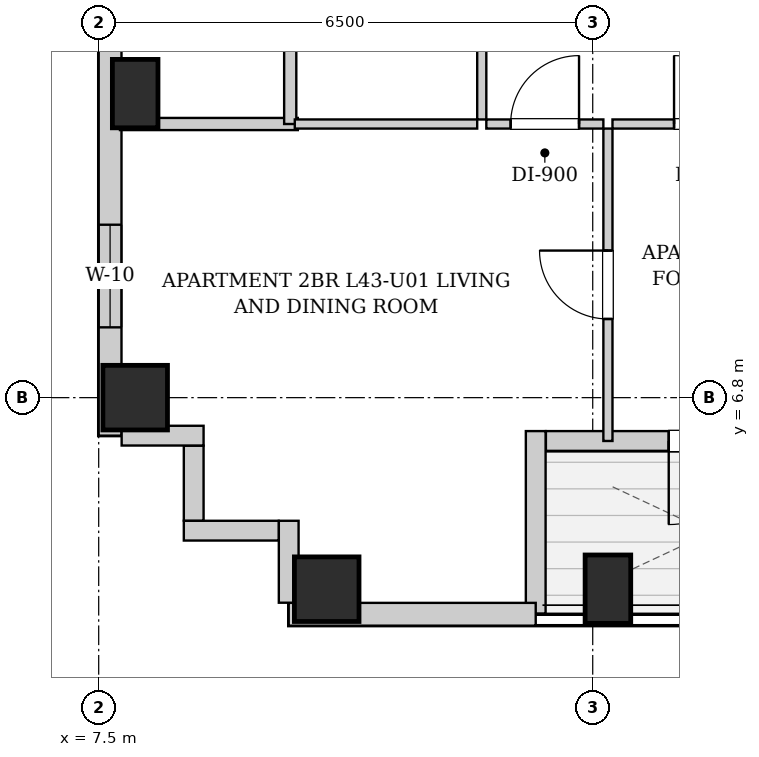
"""IFC4 building model, lengths in metres.
Left out: names, types, materials, properties, quantities, classifications, styles, units other than length and angle.
Written with IfcOpenShell. Run it as: python <this file> out.ifc"""

import sys

from ifc_helpers import new_model, si_unit, direction, frame, frame_2d, origin, origin_2d, place, context, subcontext, project, spatial, rectangle, extrude, element, fill, save


model = new_model("IFC4")
c1 = context("Model", 3, precision=1e-05, world=origin(), true_north=direction((0.0, 1.0)))
c2 = subcontext(c1, "Body", "Model", "MODEL_VIEW")
j1 = project(units=[si_unit("LENGTHUNIT", "METRE"), si_unit("PLANEANGLEUNIT", "RADIAN")], contexts=[c1])
p1 = place(None, origin())
s1 = spatial("IfcSite", under=j1, at=p1, CompositionType="ELEMENT")
p2 = place(p1, origin())
s2 = spatial("IfcBuilding", under=s1, at=p2, CompositionType="ELEMENT")
p3 = place(p2, frame((0.0, 0.0, 150.4)))
s3 = spatial("IfcBuildingStorey", under=s2, at=p3, CompositionType="ELEMENT", Elevation=150.4)
p4 = place(p3, frame((10.5, 4.28, 0.0), z_axis=(0.0, 0.0, 1.0), x_axis=(1.0, 0.0, 0.0)))
e1 = element("IfcColumn", 1, at=p4, inside=s3, PredefinedType="COLUMN", context=c2, shape_type="SweptSolid", body=[
    extrude(rectangle(XDim=0.85, YDim=0.85, at=origin_2d()), origin(), (0.0, 0.0, 1.0), 3.25),
])
p5 = place(p3, frame((14.2, 4.28, 0.0), z_axis=(0.0, 0.0, 1.0), x_axis=(1.0, 0.0, 0.0)))
e2 = element("IfcColumn", 2, at=p5, inside=s3, PredefinedType="COLUMN", context=c2, shape_type="SweptSolid", body=[
    extrude(rectangle(XDim=0.6, YDim=0.9, at=origin_2d()), origin(), (0.0, 0.0, 1.0), 3.25),
])
p6 = place(p3, frame((7.98, 6.8, 0.0), z_axis=(0.0, 0.0, 1.0), x_axis=(1.0, 0.0, 0.0)))
e3 = element("IfcColumn", 3, at=p6, inside=s3, PredefinedType="COLUMN", context=c2, shape_type="SweptSolid", body=[
    extrude(rectangle(XDim=0.85, YDim=0.85, at=origin_2d()), origin(), (0.0, 0.0, 1.0), 3.25),
])
p7 = place(p3, frame((7.98, 10.8, 0.0), z_axis=(0.0, 0.0, 1.0), x_axis=(1.0, 0.0, 0.0)))
e4 = element("IfcColumn", 4, at=p7, inside=s3, PredefinedType="COLUMN", context=c2, shape_type="SweptSolid", body=[
    extrude(rectangle(XDim=0.6, YDim=0.9, at=origin_2d()), origin(), (0.0, 0.0, 1.0), 3.25),
])
p8 = place(p3, frame((17.716, 6.23, 0.0), z_axis=(0.0, 0.0, 1.0), x_axis=(-1.0, 0.0, 0.0)))
e5 = element("IfcWall", 5, at=p8, inside=s3, PredefinedType="SOLIDWALL", context=c2, shape_type="SweptSolid", body=[
    extrude(rectangle(XDim=4.332, YDim=0.26, at=frame_2d((2.166, 0.0))), origin(), (0.0, 0.0, 1.0), 2.99),
])
p9 = place(p8, frame((1.616, 0.0, 0.0)))
e6 = element("IfcOpeningElement", 6, at=p9, cuts=e5, PredefinedType="OPENING", context=c2, shape_type="SweptSolid", body=[
    extrude(rectangle(XDim=1.1, YDim=2.0, at=frame_2d((0.55, 1.0))), frame((0.0, 0.14, 0.0), z_axis=(0.0, -1.0, 0.0), x_axis=(1.0, 0.0, 0.0)), (0.0, 0.0, 1.0), 0.28),
])
p10 = place(p8, frame((0.606, 0.0, 0.55)))
e7 = element("IfcOpeningElement", 7, at=p10, cuts=e5, PredefinedType="OPENING", context=c2, shape_type="SweptSolid", body=[
    extrude(rectangle(XDim=0.85, YDim=1.2, at=frame_2d((0.425, 0.6))), frame((0.0, 0.14, 0.0), z_axis=(0.0, -1.0, 0.0), x_axis=(1.0, 0.0, 0.0)), (0.0, 0.0, 1.0), 0.28),
])
p11 = place(p3, frame((13.25, 6.36, 0.0), z_axis=(0.0, 0.0, 1.0), x_axis=(0.0, -1.0, 0.0)))
e8 = element("IfcWall", 8, at=p11, inside=s3, PredefinedType="SOLIDWALL", context=c2, shape_type="SweptSolid", body=[
    extrude(rectangle(XDim=2.4, YDim=0.26, at=frame_2d((1.2, 0.0))), origin(), (0.0, 0.0, 1.0), 2.99),
])
p12 = place(p3, frame((13.25, 3.95, 0.0), z_axis=(0.0, 0.0, 1.0), x_axis=(-1.0, 0.0, 0.0)))
e9 = element("IfcWall", 9, at=p12, inside=s3, PredefinedType="SOLIDWALL", context=c2, shape_type="SweptSolid", body=[
    extrude(rectangle(XDim=3.25, YDim=0.3, at=frame_2d((1.625, 0.0))), origin(), (0.0, 0.0, 1.0), 2.99),
])
p13 = place(p3, frame((7.65, 6.3, 0.0), z_axis=(0.0, 0.0, 1.0), x_axis=(0.0, 1.0, 0.0)))
e10 = element("IfcWall", 10, at=p13, inside=s3, PredefinedType="SOLIDWALL", context=c2, shape_type="SweptSolid", body=[
    extrude(rectangle(XDim=34.5, YDim=0.3, at=frame_2d((17.25, 0.0))), origin(), (0.0, 0.0, 1.0), 2.99),
])
p14 = place(p13, frame((1.425, 0.0, 0.55)))
e11 = element("IfcOpeningElement", 11, at=p14, cuts=e10, PredefinedType="OPENING", context=c2, shape_type="SweptSolid", body=[
    extrude(rectangle(XDim=1.35, YDim=1.2, at=frame_2d((0.675, 0.6))), frame((0.0, 0.16, 0.0), z_axis=(0.0, -1.0, 0.0), x_axis=(1.0, 0.0, 0.0)), (0.0, 0.0, 1.0), 0.32),
])
p15 = place(p13, frame((30.15, 0.0, 0.55)))
e12 = element("IfcOpeningElement", 12, at=p15, cuts=e10, PredefinedType="OPENING", context=c2, shape_type="SweptSolid", body=[
    extrude(rectangle(XDim=1.35, YDim=1.2, at=frame_2d((0.675, 0.6))), frame((0.0, 0.16, 0.0), z_axis=(0.0, -1.0, 0.0), x_axis=(1.0, 0.0, 0.0)), (0.0, 0.0, 1.0), 0.32),
])
p16 = place(p13, frame((28.31, 0.0, 0.55)))
e13 = element("IfcOpeningElement", 13, at=p16, cuts=e10, PredefinedType="OPENING", context=c2, shape_type="SweptSolid", body=[
    extrude(rectangle(XDim=1.35, YDim=1.2, at=frame_2d((0.675, 0.6))), frame((0.0, 0.16, 0.0), z_axis=(0.0, -1.0, 0.0), x_axis=(1.0, 0.0, 0.0)), (0.0, 0.0, 1.0), 0.32),
])
p17 = place(p13, frame((10.35, 0.0, 0.55)))
e14 = element("IfcOpeningElement", 14, at=p17, cuts=e10, PredefinedType="OPENING", context=c2, shape_type="SweptSolid", body=[
    extrude(rectangle(XDim=1.35, YDim=1.2, at=frame_2d((0.675, 0.6))), frame((0.0, 0.16, 0.0), z_axis=(0.0, -1.0, 0.0), x_axis=(1.0, 0.0, 0.0)), (0.0, 0.0, 1.0), 0.32),
])
p18 = place(p13, frame((19.725, 0.0, 0.55)))
e15 = element("IfcOpeningElement", 15, at=p18, cuts=e10, PredefinedType="OPENING", context=c2, shape_type="SweptSolid", body=[
    extrude(rectangle(XDim=1.35, YDim=1.2, at=frame_2d((0.675, 0.6))), frame((0.0, 0.16, 0.0), z_axis=(0.0, -1.0, 0.0), x_axis=(1.0, 0.0, 0.0)), (0.0, 0.0, 1.0), 0.32),
])
p19 = place(p3, frame((10.0, 4.102, 0.0), z_axis=(0.0, 0.0, 1.0), x_axis=(0.0, 1.0, 0.0)))
e16 = element("IfcWall", 16, at=p19, inside=s3, PredefinedType="SOLIDWALL", context=c2, shape_type="SweptSolid", body=[
    extrude(rectangle(XDim=1.078, YDim=0.26, at=frame_2d((0.539, 0.0))), origin(), (0.0, 0.0, 1.0), 2.99),
])
p20 = place(p3, frame((9.868, 5.05, 0.0), z_axis=(0.0, 0.0, 1.0), x_axis=(-1.0, 0.0, 0.0)))
e17 = element("IfcWall", 17, at=p20, inside=s3, PredefinedType="SOLIDWALL", context=c2, shape_type="SweptSolid", body=[
    extrude(rectangle(XDim=1.248, YDim=0.26, at=frame_2d((0.624, 0.0))), origin(), (0.0, 0.0, 1.0), 2.99),
])
p21 = place(p3, frame((8.75, 5.182, 0.0), z_axis=(0.0, 0.0, 1.0), x_axis=(0.0, 1.0, 0.0)))
e18 = element("IfcWall", 18, at=p21, inside=s3, PredefinedType="SOLIDWALL", context=c2, shape_type="SweptSolid", body=[
    extrude(rectangle(XDim=0.986, YDim=0.26, at=frame_2d((0.493, 0.0))), origin(), (0.0, 0.0, 1.0), 2.99),
])
p22 = place(p3, frame((8.88, 6.3, 0.0), z_axis=(0.0, 0.0, 1.0), x_axis=(-1.0, 0.0, 0.0)))
e19 = element("IfcWall", 19, at=p22, inside=s3, PredefinedType="SOLIDWALL", context=c2, shape_type="SweptSolid", body=[
    extrude(rectangle(XDim=1.078, YDim=0.26, at=frame_2d((0.539, 0.0))), origin(), (0.0, 0.0, 1.0), 2.99),
])
p23 = place(p3, frame((7.78, 10.4, 0.0), z_axis=(0.0, 0.0, 1.0), x_axis=(1.0, 0.0, 0.0)))
e20 = element("IfcWall", 20, at=p23, inside=s3, PredefinedType="PARTITIONING", context=c2, shape_type="SweptSolid", body=[
    extrude(rectangle(XDim=2.34, YDim=0.16, at=frame_2d((1.17, 0.0))), origin(), (0.0, 0.0, 1.0), 2.99),
])
p24 = place(p3, frame((10.02, 10.4, 0.0), z_axis=(0.0, 0.0, 1.0), x_axis=(0.0, 1.0, 0.0)))
e21 = element("IfcWall", 21, at=p24, inside=s3, PredefinedType="PARTITIONING", context=c2, shape_type="SweptSolid", body=[
    extrude(rectangle(XDim=2.91, YDim=0.16, at=frame_2d((1.455, 0.0))), origin(), (0.0, 0.0, 1.0), 2.99),
])
p25 = place(p3, frame((12.54, 10.46, 0.0), z_axis=(0.0, 0.0, 1.0), x_axis=(0.0, 1.0, 0.0)))
e22 = element("IfcWall", 22, at=p25, inside=s3, PredefinedType="PARTITIONING", context=c2, shape_type="SweptSolid", body=[
    extrude(rectangle(XDim=2.85, YDim=0.12, at=frame_2d((1.425, 0.0))), origin(), (0.0, 0.0, 1.0), 2.99),
])
p26 = place(p25, frame((0.995, 0.0, 0.0)))
e23 = element("IfcOpeningElement", 23, at=p26, cuts=e22, PredefinedType="OPENING", context=c2, shape_type="SweptSolid", body=[
    extrude(rectangle(XDim=0.86, YDim=2.05, at=frame_2d((0.43, 1.025))), frame((0.0, 0.07, 0.0), z_axis=(0.0, -1.0, 0.0), x_axis=(1.0, 0.0, 0.0)), (0.0, 0.0, 1.0), 0.14),
])
p27 = place(p3, frame((10.08, 10.4, 0.0), z_axis=(0.0, 0.0, 1.0), x_axis=(1.0, 0.0, 0.0)))
e24 = element("IfcWall", 24, at=p27, inside=s3, PredefinedType="PARTITIONING", context=c2, shape_type="SweptSolid", body=[
    extrude(rectangle(XDim=2.4, YDim=0.12, at=frame_2d((1.2, 0.0))), origin(), (0.0, 0.0, 1.0), 2.99),
])
p28 = place(p3, frame((12.6, 10.4, 0.0), z_axis=(0.0, 0.0, 1.0), x_axis=(1.0, 0.0, 0.0)))
e25 = element("IfcWall", 25, at=p28, inside=s3, PredefinedType="PARTITIONING", context=c2, shape_type="SweptSolid", body=[
    extrude(rectangle(XDim=1.54, YDim=0.12, at=frame_2d((0.77, 0.0))), origin(), (0.0, 0.0, 1.0), 2.99),
])
p29 = place(p28, frame((0.32, 0.0, 0.0)))
e26 = element("IfcOpeningElement", 26, at=p29, cuts=e25, PredefinedType="OPENING", context=c2, shape_type="SweptSolid", body=[
    extrude(rectangle(XDim=0.9, YDim=2.05, at=frame_2d((0.45, 1.025))), frame((0.0, 0.07, 0.0), z_axis=(0.0, -1.0, 0.0), x_axis=(1.0, 0.0, 0.0)), (0.0, 0.0, 1.0), 0.14),
])
p30 = place(p3, frame((14.26, 10.4, 0.0), z_axis=(0.0, 0.0, 1.0), x_axis=(1.0, 0.0, 0.0)))
e27 = element("IfcWall", 27, at=p30, inside=s3, PredefinedType="PARTITIONING", context=c2, shape_type="SweptSolid", body=[
    extrude(rectangle(XDim=2.52, YDim=0.12, at=frame_2d((1.26, 0.0))), origin(), (0.0, 0.0, 1.0), 2.99),
])
p31 = place(p30, frame((0.81, 0.0, 0.0)))
e28 = element("IfcOpeningElement", 28, at=p31, cuts=e27, PredefinedType="OPENING", context=c2, shape_type="SweptSolid", body=[
    extrude(rectangle(XDim=0.9, YDim=2.05, at=frame_2d((0.45, 1.025))), frame((0.0, 0.07, 0.0), z_axis=(0.0, -1.0, 0.0), x_axis=(1.0, 0.0, 0.0)), (0.0, 0.0, 1.0), 0.14),
])
p32 = place(p3, frame((14.2, 6.23, 0.0), z_axis=(0.0, 0.0, 1.0), x_axis=(0.0, 1.0, 0.0)))
e29 = element("IfcWall", 29, at=p32, inside=s3, PredefinedType="PARTITIONING", context=c2, shape_type="SweptSolid", body=[
    extrude(rectangle(XDim=4.11, YDim=0.12, at=frame_2d((2.055, 0.0))), origin(), (0.0, 0.0, 1.0), 2.99),
])
p33 = place(p32, frame((1.605, 0.0, 0.0)))
e30 = element("IfcOpeningElement", 30, at=p33, cuts=e29, PredefinedType="OPENING", context=c2, shape_type="SweptSolid", body=[
    extrude(rectangle(XDim=0.9, YDim=2.05, at=frame_2d((0.45, 1.025))), frame((0.0, 0.07, 0.0), z_axis=(0.0, -1.0, 0.0), x_axis=(1.0, 0.0, 0.0)), (0.0, 0.0, 1.0), 0.14),
])
p34 = place(p29, origin())
e31 = element("IfcDoor", 31, at=p34, inside=s3, OperationType="SINGLE_SWING_RIGHT", PredefinedType="DOOR", context=c2, shape_type="SweptSolid", body=[
    extrude(rectangle(XDim=0.9, YDim=2.05, at=frame_2d((0.45, 1.025))), frame((0.0, 0.025, 0.0), z_axis=(0.0, -1.0, 0.0), x_axis=(1.0, 0.0, 0.0)), (0.0, 0.0, 1.0), 0.05),
])
fill(e26, e31)
p35 = place(p31, origin())
e32 = element("IfcDoor", 32, at=p35, inside=s3, OperationType="SINGLE_SWING_LEFT", PredefinedType="DOOR", context=c2, shape_type="SweptSolid", body=[
    extrude(rectangle(XDim=0.9, YDim=2.05, at=frame_2d((0.45, 1.025))), frame((0.0, 0.025, 0.0), z_axis=(0.0, -1.0, 0.0), x_axis=(1.0, 0.0, 0.0)), (0.0, 0.0, 1.0), 0.05),
])
fill(e28, e32)
p36 = place(p33, origin())
e33 = element("IfcDoor", 33, at=p36, inside=s3, OperationType="SINGLE_SWING_RIGHT", PredefinedType="DOOR", context=c2, shape_type="SweptSolid", body=[
    extrude(rectangle(XDim=0.9, YDim=2.05, at=frame_2d((0.45, 1.025))), frame((0.0, 0.025, 0.0), z_axis=(0.0, -1.0, 0.0), x_axis=(1.0, 0.0, 0.0)), (0.0, 0.0, 1.0), 0.05),
])
fill(e30, e33)
p37 = place(p9, origin())
e34 = element("IfcDoor", 34, at=p37, inside=s3, OperationType="SINGLE_SWING_RIGHT", PredefinedType="DOOR", context=c2, shape_type="SweptSolid", body=[
    extrude(rectangle(XDim=1.1, YDim=2.0, at=frame_2d((0.55, 1.0))), frame((0.0, 0.025, 0.0), z_axis=(0.0, -1.0, 0.0), x_axis=(1.0, 0.0, 0.0)), (0.0, 0.0, 1.0), 0.05),
])
fill(e6, e34)
p38 = place(p14, origin())
e35 = element("IfcWindow", 35, at=p38, inside=s3, PartitioningType="SINGLE_PANEL", PredefinedType="WINDOW", context=c2, shape_type="SweptSolid", body=[
    extrude(rectangle(XDim=1.35, YDim=1.2, at=frame_2d((0.675, 0.6))), frame((0.0, 0.03, 0.0), z_axis=(0.0, -1.0, 0.0), x_axis=(1.0, 0.0, 0.0)), (0.0, 0.0, 1.0), 0.06),
])
fill(e11, e35)
save(model, sys.argv[1])
